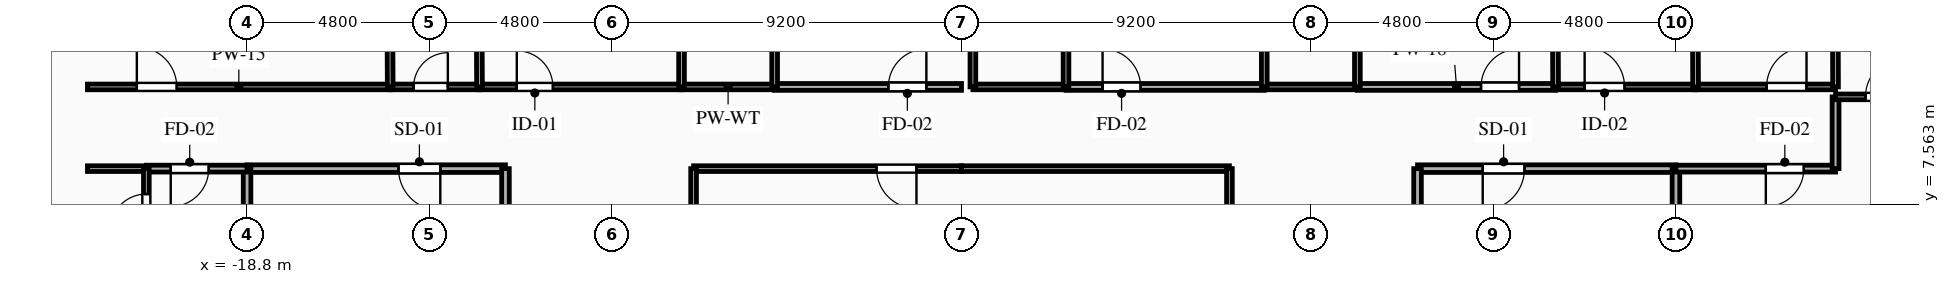
"""IFC4 building model, lengths in metres.
Left out: names, types, materials, properties, quantities, classifications, styles, units other than length and angle.
Written with IfcOpenShell. Run it as: python <this file> out.ifc"""

import sys

from ifc_helpers import new_model, si_unit, direction, frame, frame_2d, origin, place, context, subcontext, project, spatial, rectangle, extrude, element, fill, save


model = new_model("IFC4")
c1 = context("Model", 3, precision=1e-05, world=origin(), true_north=direction((0.0, 1.0)))
c2 = subcontext(c1, "Body", "Model", "MODEL_VIEW")
j1 = project(units=[si_unit("LENGTHUNIT", "METRE"), si_unit("PLANEANGLEUNIT", "RADIAN")], contexts=[c1])
p1 = place(None, origin())
s1 = spatial("IfcSite", under=j1, at=p1, CompositionType="ELEMENT")
p2 = place(p1, origin())
s2 = spatial("IfcBuilding", under=s1, at=p2, CompositionType="ELEMENT")
p3 = place(p2, frame((0.0, 0.0, 95.75)))
s3 = spatial("IfcBuildingStorey", under=s2, at=p3, CompositionType="ELEMENT", Elevation=95.75)
p4 = place(p3, frame((-12.0, 8.5, 0.0), z_axis=(0.0, 0.0, 1.0), x_axis=(-1.0, 0.0, 0.0)))
e1 = element("IfcWall", 1, at=p4, inside=s3, PredefinedType="PARTITIONING", context=c2, shape_type="SweptSolid", body=[
    extrude(rectangle(XDim=6.8, YDim=0.2, at=frame_2d((3.4, 0.0))), origin(), (0.0, 0.0, 1.0), 3.045),
])
p5 = place(p4, frame((1.715, 0.0, 0.0)))
e2 = element("IfcOpeningElement", 2, at=p5, cuts=e1, PredefinedType="OPENING", context=c2, shape_type="SweptSolid", body=[
    extrude(rectangle(XDim=1.1, YDim=2.15, at=frame_2d((0.55, 1.075))), frame((0.0, 0.11, 0.0), z_axis=(0.0, -1.0, 0.0), x_axis=(1.0, 0.0, 0.0)), (0.0, 0.0, 1.0), 0.22),
])
p6 = place(p3, frame((-12.0, 5.6, 0.0), z_axis=(0.0, 0.0, 1.0), x_axis=(0.0, 1.0, 0.0)))
e3 = element("IfcWall", 3, at=p6, inside=s3, PredefinedType="PARTITIONING", context=c2, shape_type="SweptSolid", body=[
    extrude(rectangle(XDim=2.9, YDim=0.2, at=frame_2d((1.45, 0.0))), origin(), (0.0, 0.0, 1.0), 3.045),
])
p7 = place(p3, frame((-18.8, 8.5, 0.0), z_axis=(0.0, 0.0, 1.0), x_axis=(0.0, -1.0, 0.0)))
e4 = element("IfcWall", 4, at=p7, inside=s3, PredefinedType="PARTITIONING", context=c2, shape_type="SweptSolid", body=[
    extrude(rectangle(XDim=2.9, YDim=0.2, at=frame_2d((1.45, 0.0))), origin(), (0.0, 0.0, 1.0), 2.53),
])
p8 = place(p3, frame((18.8, 8.5, 0.0), z_axis=(0.0, 0.0, 1.0), x_axis=(-1.0, 0.0, 0.0)))
e5 = element("IfcWall", 5, at=p8, inside=s3, PredefinedType="PARTITIONING", context=c2, shape_type="SweptSolid", body=[
    extrude(rectangle(XDim=6.8, YDim=0.2, at=frame_2d((3.4, 0.0))), origin(), (0.0, 0.0, 1.0), 3.045),
])
p9 = place(p8, frame((3.985, 0.0, 0.0)))
e6 = element("IfcOpeningElement", 6, at=p9, cuts=e5, PredefinedType="OPENING", context=c2, shape_type="SweptSolid", body=[
    extrude(rectangle(XDim=1.1, YDim=2.15, at=frame_2d((0.55, 1.075))), frame((0.0, 0.11, 0.0), z_axis=(0.0, -1.0, 0.0), x_axis=(1.0, 0.0, 0.0)), (0.0, 0.0, 1.0), 0.22),
])
p10 = place(p3, frame((12.0, 8.5, 0.0), z_axis=(0.0, 0.0, 1.0), x_axis=(0.0, -1.0, 0.0)))
e7 = element("IfcWall", 7, at=p10, inside=s3, PredefinedType="PARTITIONING", context=c2, shape_type="SweptSolid", body=[
    extrude(rectangle(XDim=2.9, YDim=0.2, at=frame_2d((1.45, 0.0))), origin(), (0.0, 0.0, 1.0), 3.045),
])
p11 = place(p3, frame((18.8, 5.6, 0.0), z_axis=(0.0, 0.0, 1.0), x_axis=(0.0, 1.0, 0.0)))
e8 = element("IfcWall", 8, at=p11, inside=s3, PredefinedType="PARTITIONING", context=c2, shape_type="SweptSolid", body=[
    extrude(rectangle(XDim=2.9, YDim=0.2, at=frame_2d((1.45, 0.0))), origin(), (0.0, 0.0, 1.0), 2.53),
])
p12 = place(p3, frame((-18.8, 8.5, 0.0), z_axis=(0.0, 0.0, 1.0), x_axis=(-1.0, 0.0, 0.0)))
e9 = element("IfcWall", 9, at=p12, inside=s3, PredefinedType="PARTITIONING", context=c2, shape_type="SweptSolid", body=[
    extrude(rectangle(XDim=2.65, YDim=0.18, at=frame_2d((1.325, 0.0))), origin(), (0.0, 0.0, 1.0), 3.045),
])
p13 = place(p12, frame((1.009, 0.0, 0.0)))
e10 = element("IfcOpeningElement", 10, at=p13, cuts=e9, PredefinedType="OPENING", context=c2, shape_type="SweptSolid", body=[
    extrude(rectangle(XDim=1.0, YDim=2.15, at=frame_2d((0.5, 1.075))), frame((0.0, 0.1, 0.0), z_axis=(0.0, -1.0, 0.0), x_axis=(1.0, 0.0, 0.0)), (0.0, 0.0, 1.0), 0.2),
])
p14 = place(p3, frame((-21.45, 8.5, 0.0), z_axis=(0.0, 0.0, 1.0), x_axis=(-1.0, 0.0, 0.0)))
e11 = element("IfcWall", 11, at=p14, inside=s3, PredefinedType="PARTITIONING", context=c2, shape_type="SweptSolid", body=[
    extrude(rectangle(XDim=1.55, YDim=0.15, at=frame_2d((0.775, 0.0))), origin(), (0.0, 0.0, 1.0), 3.045),
])
p15 = place(p3, frame((-23.0, 10.65, 0.0), z_axis=(0.0, 0.0, 1.0), x_axis=(1.0, 0.0, 0.0)))
e12 = element("IfcWall", 12, at=p15, inside=s3, PredefinedType="PARTITIONING", context=c2, shape_type="SweptSolid", body=[
    extrude(rectangle(XDim=7.967, YDim=0.15, at=frame_2d((3.983, 0.0))), origin(), (0.0, 0.0, 1.0), 3.045),
])
p16 = place(p15, frame((1.3, 0.0, 0.0)))
e13 = element("IfcOpeningElement", 13, at=p16, cuts=e12, PredefinedType="OPENING", context=c2, shape_type="SweptSolid", body=[
    extrude(rectangle(XDim=1.05, YDim=2.15, at=frame_2d((0.525, 1.075))), frame((0.0, 0.085, 0.0), z_axis=(0.0, -1.0, 0.0), x_axis=(1.0, 0.0, 0.0)), (0.0, 0.0, 1.0), 0.17),
])
p17 = place(p3, frame((-15.033, 10.65, 0.0), z_axis=(0.0, 0.0, 1.0), x_axis=(1.0, 0.0, 0.0)))
e14 = element("IfcWall", 14, at=p17, inside=s3, PredefinedType="PLUMBINGWALL", context=c2, shape_type="SweptSolid", body=[
    extrude(rectangle(XDim=2.35, YDim=0.15, at=frame_2d((1.175, 0.0))), origin(), (0.0, 0.0, 1.0), 3.045),
])
p18 = place(p17, frame((0.616, 0.0, 0.0)))
e15 = element("IfcOpeningElement", 15, at=p18, cuts=e14, PredefinedType="OPENING", context=c2, shape_type="SweptSolid", body=[
    extrude(rectangle(XDim=0.9, YDim=2.1, at=frame_2d((0.45, 1.05))), frame((0.0, 0.085, 0.0), z_axis=(0.0, -1.0, 0.0), x_axis=(1.0, 0.0, 0.0)), (0.0, 0.0, 1.0), 0.17),
])
p19 = place(p3, frame((-12.683, 10.65, 0.0), z_axis=(0.0, 0.0, 1.0), x_axis=(1.0, 0.0, 0.0)))
e16 = element("IfcWall", 16, at=p19, inside=s3, PredefinedType="PARTITIONING", context=c2, shape_type="SweptSolid", body=[
    extrude(rectangle(XDim=5.316, YDim=0.15, at=frame_2d((2.658, 0.0))), origin(), (0.0, 0.0, 1.0), 3.045),
])
p20 = place(p19, frame((0.981, 0.0, 0.0)))
e17 = element("IfcOpeningElement", 17, at=p20, cuts=e16, PredefinedType="OPENING", context=c2, shape_type="SweptSolid", body=[
    extrude(rectangle(XDim=0.95, YDim=2.1, at=frame_2d((0.475, 1.05))), frame((0.0, 0.085, 0.0), z_axis=(0.0, -1.0, 0.0), x_axis=(1.0, 0.0, 0.0)), (0.0, 0.0, 1.0), 0.17),
])
p21 = place(p3, frame((-4.917, 10.65, 0.0), z_axis=(0.0, 0.0, 1.0), x_axis=(1.0, 0.0, 0.0)))
e18 = element("IfcWall", 18, at=p21, inside=s3, PredefinedType="PARTITIONING", context=c2, shape_type="SweptSolid", body=[
    extrude(rectangle(XDim=4.917, YDim=0.18, at=frame_2d((2.458, 0.0))), origin(), (0.0, 0.0, 1.0), 3.045),
])
p22 = place(p21, frame((2.992, 0.0, 0.0)))
e19 = element("IfcOpeningElement", 19, at=p22, cuts=e18, PredefinedType="OPENING", context=c2, shape_type="SweptSolid", body=[
    extrude(rectangle(XDim=1.0, YDim=2.15, at=frame_2d((0.5, 1.075))), frame((0.0, 0.1, 0.0), z_axis=(0.0, -1.0, 0.0), x_axis=(1.0, 0.0, 0.0)), (0.0, 0.0, 1.0), 0.2),
])
p23 = place(p3, frame((-7.367, 10.65, 0.0), z_axis=(0.0, 0.0, 1.0), x_axis=(1.0, 0.0, 0.0)))
e20 = element("IfcWall", 20, at=p23, inside=s3, PredefinedType="PLUMBINGWALL", context=c2, shape_type="SweptSolid", body=[
    extrude(rectangle(XDim=2.45, YDim=0.15, at=frame_2d((1.225, 0.0))), origin(), (0.0, 0.0, 1.0), 3.045),
])
p24 = place(p3, frame((0.0, 8.5, 0.0), z_axis=(0.0, 0.0, 1.0), x_axis=(-1.0, 0.0, 0.0)))
e21 = element("IfcWall", 21, at=p24, inside=s3, PredefinedType="PARTITIONING", context=c2, shape_type="SweptSolid", body=[
    extrude(rectangle(XDim=7.05, YDim=0.15, at=frame_2d((3.525, 0.0))), origin(), (0.0, 0.0, 1.0), 3.045),
])
p25 = place(p24, frame((1.185, 0.0, 0.0)))
e22 = element("IfcOpeningElement", 22, at=p25, cuts=e21, PredefinedType="OPENING", context=c2, shape_type="SweptSolid", body=[
    extrude(rectangle(XDim=1.05, YDim=2.15, at=frame_2d((0.525, 1.075))), frame((0.0, 0.085, 0.0), z_axis=(0.0, -1.0, 0.0), x_axis=(1.0, 0.0, 0.0)), (0.0, 0.0, 1.0), 0.17),
])
p26 = place(p3, frame((23.0, 8.5, 0.0), z_axis=(0.0, 0.0, 1.0), x_axis=(-1.0, 0.0, 0.0)))
e23 = element("IfcWall", 23, at=p26, inside=s3, PredefinedType="PARTITIONING", context=c2, shape_type="SweptSolid", body=[
    extrude(rectangle(XDim=4.2, YDim=0.18, at=frame_2d((2.1, 0.0))), origin(), (0.0, 0.0, 1.0), 3.045),
])
p27 = place(p26, frame((0.835, 0.0, 0.0)))
e24 = element("IfcOpeningElement", 24, at=p27, cuts=e23, PredefinedType="OPENING", context=c2, shape_type="SweptSolid", body=[
    extrude(rectangle(XDim=1.0, YDim=2.15, at=frame_2d((0.5, 1.075))), frame((0.0, 0.1, 0.0), z_axis=(0.0, -1.0, 0.0), x_axis=(1.0, 0.0, 0.0)), (0.0, 0.0, 1.0), 0.2),
])
p28 = place(p3, frame((23.0, 10.388, 0.0), z_axis=(0.0, 0.0, 1.0), x_axis=(0.0, -1.0, 0.0)))
e25 = element("IfcWall", 25, at=p28, inside=s3, PredefinedType="PARTITIONING", context=c2, shape_type="SweptSolid", body=[
    extrude(rectangle(XDim=1.888, YDim=0.18, at=frame_2d((0.944, 0.0))), origin(), (0.0, 0.0, 1.0), 3.045),
])
p29 = place(p3, frame((2.75, 10.65, 0.0), z_axis=(0.0, 0.0, 1.0), x_axis=(1.0, 0.0, 0.0)))
e26 = element("IfcWall", 26, at=p29, inside=s3, PredefinedType="PARTITIONING", context=c2, shape_type="SweptSolid", body=[
    extrude(rectangle(XDim=5.217, YDim=0.18, at=frame_2d((2.608, 0.0))), origin(), (0.0, 0.0, 1.0), 3.045),
])
p30 = place(p29, frame((0.962, 0.0, 0.0)))
e27 = element("IfcOpeningElement", 27, at=p30, cuts=e26, PredefinedType="OPENING", context=c2, shape_type="SweptSolid", body=[
    extrude(rectangle(XDim=1.0, YDim=2.15, at=frame_2d((0.5, 1.075))), frame((0.0, 0.1, 0.0), z_axis=(0.0, -1.0, 0.0), x_axis=(1.0, 0.0, 0.0)), (0.0, 0.0, 1.0), 0.2),
])
p31 = place(p3, frame((0.3, 10.65, 0.0), z_axis=(0.0, 0.0, 1.0), x_axis=(1.0, 0.0, 0.0)))
e28 = element("IfcWall", 28, at=p31, inside=s3, PredefinedType="PLUMBINGWALL", context=c2, shape_type="SweptSolid", body=[
    extrude(rectangle(XDim=2.45, YDim=0.15, at=frame_2d((1.225, 0.0))), origin(), (0.0, 0.0, 1.0), 3.045),
])
p32 = place(p3, frame((10.417, 10.65, 0.0), z_axis=(0.0, 0.0, 1.0), x_axis=(1.0, 0.0, 0.0)))
e29 = element("IfcWall", 29, at=p32, inside=s3, PredefinedType="PARTITIONING", context=c2, shape_type="SweptSolid", body=[
    extrude(rectangle(XDim=5.216, YDim=0.18, at=frame_2d((2.608, 0.0))), origin(), (0.0, 0.0, 1.0), 3.045),
])
p33 = place(p32, frame((3.254, 0.0, 0.0)))
e30 = element("IfcOpeningElement", 30, at=p33, cuts=e29, PredefinedType="OPENING", context=c2, shape_type="SweptSolid", body=[
    extrude(rectangle(XDim=1.0, YDim=2.15, at=frame_2d((0.5, 1.075))), frame((0.0, 0.1, 0.0), z_axis=(0.0, -1.0, 0.0), x_axis=(1.0, 0.0, 0.0)), (0.0, 0.0, 1.0), 0.2),
])
p34 = place(p3, frame((7.967, 10.65, 0.0), z_axis=(0.0, 0.0, 1.0), x_axis=(1.0, 0.0, 0.0)))
e31 = element("IfcWall", 31, at=p34, inside=s3, PredefinedType="PLUMBINGWALL", context=c2, shape_type="SweptSolid", body=[
    extrude(rectangle(XDim=2.45, YDim=0.15, at=frame_2d((1.225, 0.0))), origin(), (0.0, 0.0, 1.0), 3.045),
])
p35 = place(p3, frame((15.633, 10.65, 0.0), z_axis=(0.0, 0.0, 1.0), x_axis=(1.0, 0.0, 0.0)))
e32 = element("IfcWall", 32, at=p35, inside=s3, PredefinedType="PARTITIONING", context=c2, shape_type="SweptSolid", body=[
    extrude(rectangle(XDim=3.683, YDim=0.15, at=frame_2d((1.842, 0.0))), origin(), (0.0, 0.0, 1.0), 3.045),
])
p36 = place(p35, frame((0.764, 0.0, 0.0)))
e33 = element("IfcOpeningElement", 33, at=p36, cuts=e32, PredefinedType="OPENING", context=c2, shape_type="SweptSolid", body=[
    extrude(rectangle(XDim=1.05, YDim=2.15, at=frame_2d((0.525, 1.075))), frame((0.0, 0.085, 0.0), z_axis=(0.0, -1.0, 0.0), x_axis=(1.0, 0.0, 0.0)), (0.0, 0.0, 1.0), 0.17),
])
p37 = place(p3, frame((19.316, 10.65, 0.0), z_axis=(0.0, 0.0, 1.0), x_axis=(1.0, 0.0, 0.0)))
e34 = element("IfcWall", 34, at=p37, inside=s3, PredefinedType="PARTITIONING", context=c2, shape_type="SweptSolid", body=[
    extrude(rectangle(XDim=3.684, YDim=0.15, at=frame_2d((1.842, 0.0))), origin(), (0.0, 0.0, 1.0), 3.045),
])
p38 = place(p37, frame((1.869, 0.0, 0.0)))
e35 = element("IfcOpeningElement", 35, at=p38, cuts=e34, PredefinedType="OPENING", context=c2, shape_type="SweptSolid", body=[
    extrude(rectangle(XDim=1.05, YDim=2.15, at=frame_2d((0.525, 1.075))), frame((0.0, 0.085, 0.0), z_axis=(0.0, -1.0, 0.0), x_axis=(1.0, 0.0, 0.0)), (0.0, 0.0, 1.0), 0.17),
])
for number, where, z_axis, x_axis in (
    (36, (7.05, 8.5, 0.0), (0.0, 0.0, 1.0), (-1.0, 0.0, 0.0)),
    (37, (-7.05, 8.5, 0.0), (0.0, 0.0, 1.0), (0.0, -1.0, 0.0)),
    (38, (7.05, 1.45, 0.0), (0.0, 0.0, 1.0), (0.0, 1.0, 0.0)),
):
    element("IfcWall", number, at=place(p3, frame(where, z_axis=z_axis, x_axis=x_axis)), inside=s3, PredefinedType="PARTITIONING", context=c2, shape_type="SweptSolid", body=[
        extrude(rectangle(XDim=7.05, YDim=0.15, at=frame_2d((3.525, 0.0))), origin(), (0.0, 0.0, 1.0), 3.045),
    ])
p39 = place(p3, frame((-21.45, 5.68, 0.0), z_axis=(0.0, 0.0, 1.0), x_axis=(0.0, 1.0, 0.0)))
e39 = element("IfcWall", 39, at=p39, inside=s3, PredefinedType="PARTITIONING", context=c2, shape_type="SweptSolid", body=[
    extrude(rectangle(XDim=2.82, YDim=0.15, at=frame_2d((1.41, 0.0))), origin(), (0.0, 0.0, 1.0), 3.045),
])
p40 = place(p39, frame((1.201, 0.0, 0.0)))
e40 = element("IfcOpeningElement", 40, at=p40, cuts=e39, PredefinedType="OPENING", context=c2, shape_type="SweptSolid", body=[
    extrude(rectangle(XDim=0.95, YDim=2.1, at=frame_2d((0.475, 1.05))), frame((0.0, 0.085, 0.0), z_axis=(0.0, -1.0, 0.0), x_axis=(1.0, 0.0, 0.0)), (0.0, 0.0, 1.0), 0.17),
])
p41 = place(p3, frame((23.0, 10.388, 0.0), z_axis=(0.0, 0.0, 1.0), x_axis=(1.0, 0.0, 0.0)))
e41 = element("IfcWall", 41, at=p41, inside=s3, PredefinedType="PARTITIONING", context=c2, shape_type="SweptSolid", body=[
    extrude(rectangle(XDim=3.871, YDim=0.15, at=frame_2d((1.936, 0.0))), origin(), (0.0, 0.0, 1.0), 3.045),
])
p42 = place(p41, frame((0.788, 0.0, 0.0)))
e42 = element("IfcOpeningElement", 42, at=p42, cuts=e41, PredefinedType="OPENING", context=c2, shape_type="SweptSolid", body=[
    extrude(rectangle(XDim=1.05, YDim=2.15, at=frame_2d((0.525, 1.075))), frame((0.0, 0.085, 0.0), z_axis=(0.0, -1.0, 0.0), x_axis=(1.0, 0.0, 0.0)), (0.0, 0.0, 1.0), 0.17),
])
p43 = place(p3, frame((23.0, 10.65, 0.0), z_axis=(0.0, 0.0, 1.0), x_axis=(-0.0036027147, 0.999993510202, 0.0)))
e43 = element("IfcWall", 43, at=p43, inside=s3, PredefinedType="PARTITIONING", context=c2, shape_type="SweptSolid", body=[
    extrude(rectangle(XDim=12.198, YDim=0.15, at=frame_2d((6.099, 0.0))), origin(), (0.0, 0.0, 1.0), 3.045),
])
p44 = place(p3, frame((-15.077, 18.85, 0.0), z_axis=(0.0, 0.0, 1.0), x_axis=(0.005358979853, -0.999985640564, 0.0)))
e44 = element("IfcWall", 44, at=p44, inside=s3, PredefinedType="PLUMBINGWALL", context=c2, shape_type="SweptSolid", body=[
    extrude(rectangle(XDim=8.2, YDim=0.15, at=frame_2d((4.1, 0.0))), origin(), (0.0, 0.0, 1.0), 3.045),
])
p45 = place(p3, frame((-12.727, 19.097, 0.0), z_axis=(0.0, 0.0, 1.0), x_axis=(0.005173341175, -0.999986618181, 0.0)))
e45 = element("IfcWall", 45, at=p45, inside=s3, PredefinedType="PLUMBINGWALL", context=c2, shape_type="SweptSolid", body=[
    extrude(rectangle(XDim=8.447, YDim=0.15, at=frame_2d((4.224, 0.0))), origin(), (0.0, 0.0, 1.0), 3.045),
])
for number, where, z_axis, x_axis in (
    (46, (-7.367, 12.8, 0.0), (0.0, 0.0, 1.0), (0.0, -1.0, 0.0)),
    (47, (-4.917, 10.65, 0.0), (0.0, 0.0, 1.0), (0.0, 1.0, 0.0)),
    (48, (0.3, 12.8, 0.0), (0.0, 0.0, 1.0), (0.0, -1.0, 0.0)),
    (49, (2.75, 10.65, 0.0), (0.0, 0.0, 1.0), (0.0, 1.0, 0.0)),
    (50, (7.967, 12.8, 0.0), (0.0, 0.0, 1.0), (0.0, -1.0, 0.0)),
    (51, (10.417, 10.65, 0.0), (0.0, 0.0, 1.0), (0.0, 1.0, 0.0)),
):
    element("IfcWall", number, at=place(p3, frame(where, z_axis=z_axis, x_axis=x_axis)), inside=s3, PredefinedType="PLUMBINGWALL", context=c2, shape_type="SweptSolid", body=[
        extrude(rectangle(XDim=2.15, YDim=0.15, at=frame_2d((1.075, 0.0))), origin(), (0.0, 0.0, 1.0), 3.045),
    ])
p46 = place(p3, frame((15.589, 22.073, 0.0), z_axis=(0.0, 0.0, 1.0), x_axis=(0.003846947384, -0.999992600471, 0.0)))
e52 = element("IfcWall", 52, at=p46, inside=s3, PredefinedType="PARTITIONING", context=c2, shape_type="SweptSolid", body=[
    extrude(rectangle(XDim=11.423, YDim=0.15, at=frame_2d((5.712, 0.0))), origin(), (0.0, 0.0, 1.0), 3.045),
])
p47 = place(p3, frame((19.273, 22.46, 0.0), z_axis=(0.0, 0.0, 1.0), x_axis=(0.003700156578, -0.999993154397, 0.0)))
e53 = element("IfcWall", 53, at=p47, inside=s3, PredefinedType="PARTITIONING", context=c2, shape_type="SweptSolid", body=[
    extrude(rectangle(XDim=11.811, YDim=0.15, at=frame_2d((5.905, 0.0))), origin(), (0.0, 0.0, 1.0), 3.045),
])
p48 = place(p5, origin())
e54 = element("IfcDoor", 54, at=p48, inside=s3, OperationType="SINGLE_SWING_LEFT", PredefinedType="DOOR", context=c2, shape_type="SweptSolid", body=[
    extrude(rectangle(XDim=1.1, YDim=2.15, at=frame_2d((0.55, 1.075))), frame((0.0, 0.025, 0.0), z_axis=(0.0, -1.0, 0.0), x_axis=(1.0, 0.0, 0.0)), (0.0, 0.0, 1.0), 0.05),
])
fill(e2, e54)
p49 = place(p9, origin())
e55 = element("IfcDoor", 55, at=p49, inside=s3, OperationType="SINGLE_SWING_RIGHT", PredefinedType="DOOR", context=c2, shape_type="SweptSolid", body=[
    extrude(rectangle(XDim=1.1, YDim=2.15, at=frame_2d((0.55, 1.075))), frame((0.0, 0.025, 0.0), z_axis=(0.0, -1.0, 0.0), x_axis=(1.0, 0.0, 0.0)), (0.0, 0.0, 1.0), 0.05),
])
fill(e6, e55)
p50 = place(p13, origin())
e56 = element("IfcDoor", 56, at=p50, inside=s3, OperationType="SINGLE_SWING_RIGHT", PredefinedType="DOOR", context=c2, shape_type="SweptSolid", body=[
    extrude(rectangle(XDim=1.0, YDim=2.15, at=frame_2d((0.5, 1.075))), frame((0.0, 0.025, 0.0), z_axis=(0.0, -1.0, 0.0), x_axis=(1.0, 0.0, 0.0)), (0.0, 0.0, 1.0), 0.05),
])
fill(e10, e56)
p51 = place(p16, origin())
e57 = element("IfcDoor", 57, at=p51, inside=s3, OperationType="SINGLE_SWING_LEFT", PredefinedType="DOOR", context=c2, shape_type="SweptSolid", body=[
    extrude(rectangle(XDim=1.05, YDim=2.15, at=frame_2d((0.525, 1.075))), frame((0.0, 0.025, 0.0), z_axis=(0.0, -1.0, 0.0), x_axis=(1.0, 0.0, 0.0)), (0.0, 0.0, 1.0), 0.05),
])
fill(e13, e57)
p52 = place(p18, origin())
e58 = element("IfcDoor", 58, at=p52, inside=s3, OperationType="SINGLE_SWING_RIGHT", PredefinedType="DOOR", context=c2, shape_type="SweptSolid", body=[
    extrude(rectangle(XDim=0.9, YDim=2.1, at=frame_2d((0.45, 1.05))), frame((0.0, 0.025, 0.0), z_axis=(0.0, -1.0, 0.0), x_axis=(1.0, 0.0, 0.0)), (0.0, 0.0, 1.0), 0.05),
])
fill(e15, e58)
p53 = place(p20, origin())
e59 = element("IfcDoor", 59, at=p53, inside=s3, OperationType="SINGLE_SWING_LEFT", PredefinedType="DOOR", context=c2, shape_type="SweptSolid", body=[
    extrude(rectangle(XDim=0.95, YDim=2.1, at=frame_2d((0.475, 1.05))), frame((0.0, 0.025, 0.0), z_axis=(0.0, -1.0, 0.0), x_axis=(1.0, 0.0, 0.0)), (0.0, 0.0, 1.0), 0.05),
])
fill(e17, e59)
p54 = place(p22, origin())
e60 = element("IfcDoor", 60, at=p54, inside=s3, OperationType="SINGLE_SWING_RIGHT", PredefinedType="DOOR", context=c2, shape_type="SweptSolid", body=[
    extrude(rectangle(XDim=1.0, YDim=2.15, at=frame_2d((0.5, 1.075))), frame((0.0, 0.025, 0.0), z_axis=(0.0, -1.0, 0.0), x_axis=(1.0, 0.0, 0.0)), (0.0, 0.0, 1.0), 0.05),
])
fill(e19, e60)
p55 = place(p25, origin())
e61 = element("IfcDoor", 61, at=p55, inside=s3, OperationType="SINGLE_SWING_LEFT", PredefinedType="DOOR", context=c2, shape_type="SweptSolid", body=[
    extrude(rectangle(XDim=1.05, YDim=2.15, at=frame_2d((0.525, 1.075))), frame((0.0, 0.025, 0.0), z_axis=(0.0, -1.0, 0.0), x_axis=(1.0, 0.0, 0.0)), (0.0, 0.0, 1.0), 0.05),
])
fill(e22, e61)
p56 = place(p27, origin())
e62 = element("IfcDoor", 62, at=p56, inside=s3, OperationType="SINGLE_SWING_RIGHT", PredefinedType="DOOR", context=c2, shape_type="SweptSolid", body=[
    extrude(rectangle(XDim=1.0, YDim=2.15, at=frame_2d((0.5, 1.075))), frame((0.0, 0.025, 0.0), z_axis=(0.0, -1.0, 0.0), x_axis=(1.0, 0.0, 0.0)), (0.0, 0.0, 1.0), 0.05),
])
fill(e24, e62)
p57 = place(p30, origin())
e63 = element("IfcDoor", 63, at=p57, inside=s3, OperationType="SINGLE_SWING_LEFT", PredefinedType="DOOR", context=c2, shape_type="SweptSolid", body=[
    extrude(rectangle(XDim=1.0, YDim=2.15, at=frame_2d((0.5, 1.075))), frame((0.0, 0.025, 0.0), z_axis=(0.0, -1.0, 0.0), x_axis=(1.0, 0.0, 0.0)), (0.0, 0.0, 1.0), 0.05),
])
fill(e27, e63)
p58 = place(p33, origin())
e64 = element("IfcDoor", 64, at=p58, inside=s3, OperationType="SINGLE_SWING_RIGHT", PredefinedType="DOOR", context=c2, shape_type="SweptSolid", body=[
    extrude(rectangle(XDim=1.0, YDim=2.15, at=frame_2d((0.5, 1.075))), frame((0.0, 0.025, 0.0), z_axis=(0.0, -1.0, 0.0), x_axis=(1.0, 0.0, 0.0)), (0.0, 0.0, 1.0), 0.05),
])
fill(e30, e64)
p59 = place(p36, origin())
e65 = element("IfcDoor", 65, at=p59, inside=s3, OperationType="SINGLE_SWING_LEFT", PredefinedType="DOOR", context=c2, shape_type="SweptSolid", body=[
    extrude(rectangle(XDim=1.05, YDim=2.15, at=frame_2d((0.525, 1.075))), frame((0.0, 0.025, 0.0), z_axis=(0.0, -1.0, 0.0), x_axis=(1.0, 0.0, 0.0)), (0.0, 0.0, 1.0), 0.05),
])
fill(e33, e65)
p60 = place(p38, origin())
e66 = element("IfcDoor", 66, at=p60, inside=s3, OperationType="SINGLE_SWING_RIGHT", PredefinedType="DOOR", context=c2, shape_type="SweptSolid", body=[
    extrude(rectangle(XDim=1.05, YDim=2.15, at=frame_2d((0.525, 1.075))), frame((0.0, 0.025, 0.0), z_axis=(0.0, -1.0, 0.0), x_axis=(1.0, 0.0, 0.0)), (0.0, 0.0, 1.0), 0.05),
])
fill(e35, e66)
p61 = place(p40, origin())
e67 = element("IfcDoor", 67, at=p61, inside=s3, OperationType="SINGLE_SWING_LEFT", PredefinedType="DOOR", context=c2, shape_type="SweptSolid", body=[
    extrude(rectangle(XDim=0.95, YDim=2.1, at=frame_2d((0.475, 1.05))), frame((0.0, 0.025, 0.0), z_axis=(0.0, -1.0, 0.0), x_axis=(1.0, 0.0, 0.0)), (0.0, 0.0, 1.0), 0.05),
])
fill(e40, e67)
p62 = place(p42, origin())
e68 = element("IfcDoor", 68, at=p62, inside=s3, OperationType="SINGLE_SWING_RIGHT", PredefinedType="DOOR", context=c2, shape_type="SweptSolid", body=[
    extrude(rectangle(XDim=1.05, YDim=2.15, at=frame_2d((0.525, 1.075))), frame((0.0, 0.025, 0.0), z_axis=(0.0, -1.0, 0.0), x_axis=(1.0, 0.0, 0.0)), (0.0, 0.0, 1.0), 0.05),
])
fill(e42, e68)
save(model, sys.argv[1])
